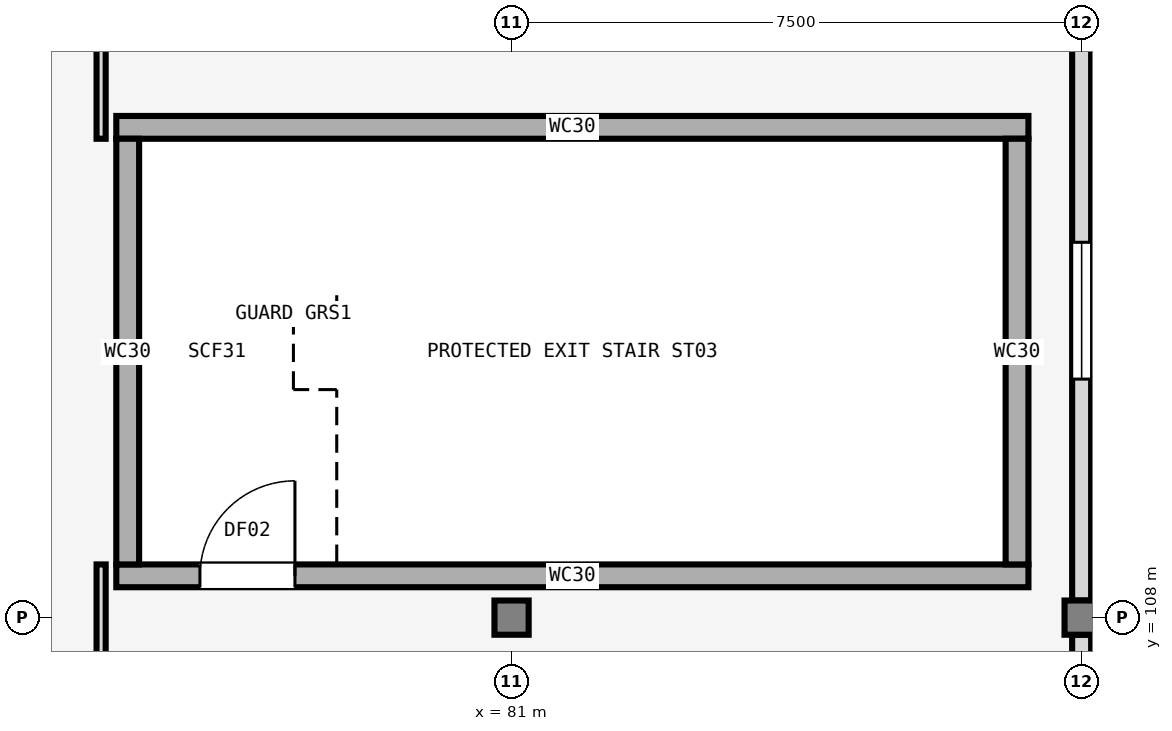
"""IFC4 building model, lengths in metres.
Left out: names, types, materials, properties, quantities, classifications, styles, units other than length and angle.
Written with IfcOpenShell. Run it as: python <this file> out.ifc"""

import sys

from ifc_helpers import new_model, si_unit, direction, frame, frame_2d, origin, origin_2d, place, context, subcontext, project, spatial, rectangle, extrude, element, fill, save


model = new_model("IFC4")
c1 = context("Model", 3, precision=1e-05, world=origin(), true_north=direction((0.0, 1.0)))
c2 = subcontext(c1, "Body", "Model", "MODEL_VIEW")
j1 = project(units=[si_unit("LENGTHUNIT", "METRE"), si_unit("PLANEANGLEUNIT", "RADIAN")], contexts=[c1])
p1 = place(None, origin())
s1 = spatial("IfcSite", under=j1, at=p1, CompositionType="ELEMENT")
p2 = place(p1, origin())
s2 = spatial("IfcBuilding", under=s1, at=p2, CompositionType="ELEMENT")
p3 = place(p2, frame((0.0, 0.0, 17.7)))
s3 = spatial("IfcBuildingStorey", under=s2, at=p3, CompositionType="ELEMENT", Elevation=17.7)
for number, where, z_axis, x_axis in (
    (1, (81.0, 108.0, 0.0), (0.0, 0.0, 1.0), (1.0, 0.0, 0.0)),
    (2, (88.5, 108.0, 0.0), (0.0, 0.0, 1.0), (1.0, 0.0, 0.0)),
):
    element("IfcColumn", number, at=place(p3, frame(where, z_axis=z_axis, x_axis=x_axis)), inside=s3, PredefinedType="COLUMN", context=c2, shape_type="SweptSolid", body=[
        extrude(rectangle(XDim=0.45, YDim=0.45, at=origin_2d()), origin(), (0.0, 0.0, 1.0), 3.96),
    ])
p4 = place(p3, frame((88.5, 100.225, 0.0), z_axis=(0.0, 0.0, 1.0), x_axis=(0.0, 1.0, 0.0)))
e3 = element("IfcWall", 3, at=p4, inside=s3, PredefinedType="SOLIDWALL", context=c2, shape_type="SweptSolid", body=[
    extrude(rectangle(XDim=7.55, YDim=0.25, at=frame_2d((3.775, 0.0))), origin(), (0.0, 0.0, 1.0), 3.49),
])
p5 = place(p4, frame((2.975, 0.0, 0.0)))
e4 = element("IfcOpeningElement", 4, at=p5, cuts=e3, PredefinedType="OPENING", context=c2, shape_type="SweptSolid", body=[
    extrude(rectangle(XDim=1.6, YDim=2.2, at=frame_2d((0.8, 1.1))), frame((0.0, 0.135, 0.0), z_axis=(0.0, -1.0, 0.0), x_axis=(1.0, 0.0, 0.0)), (0.0, 0.0, 1.0), 0.27),
])
p6 = place(p3, frame((88.5, 108.225, 0.0), z_axis=(0.0, 0.0, 1.0), x_axis=(0.0, 1.0, 0.0)))
e5 = element("IfcWall", 5, at=p6, inside=s3, PredefinedType="SOLIDWALL", context=c2, shape_type="SweptSolid", body=[
    extrude(rectangle(XDim=7.625, YDim=0.25, at=frame_2d((3.812, 0.0))), origin(), (0.0, 0.0, 1.0), 3.49),
])
p7 = place(p6, frame((2.913, 0.0, 0.95)))
e6 = element("IfcOpeningElement", 6, at=p7, cuts=e5, PredefinedType="OPENING", context=c2, shape_type="SweptSolid", body=[
    extrude(rectangle(XDim=1.8, YDim=1.5, at=frame_2d((0.9, 0.75))), frame((0.0, 0.135, 0.0), z_axis=(0.0, -1.0, 0.0), x_axis=(1.0, 0.0, 0.0)), (0.0, 0.0, 1.0), 0.27),
])
p8 = place(p3, frame((75.8, 108.55, 0.0), z_axis=(0.0, 0.0, 1.0), x_axis=(1.0, 0.0, 0.0)))
e7 = element("IfcWall", 7, at=p8, inside=s3, PredefinedType="SHEAR", context=c2, shape_type="SweptSolid", body=[
    extrude(rectangle(XDim=12.0, YDim=0.3, at=frame_2d((6.0, 0.0))), origin(), (0.0, 0.0, 1.0), 4.2),
])
p9 = place(p8, frame((1.1, 0.0, 0.0)))
e8 = element("IfcOpeningElement", 8, at=p9, cuts=e7, PredefinedType="OPENING", context=c2, shape_type="SweptSolid", body=[
    extrude(rectangle(XDim=1.25, YDim=2.15, at=frame_2d((0.625, 1.075))), frame((0.0, 0.16, 0.0), z_axis=(0.0, -1.0, 0.0), x_axis=(1.0, 0.0, 0.0)), (0.0, 0.0, 1.0), 0.32),
])
p10 = place(p3, frame((87.8, 114.45, 0.0), z_axis=(0.0, 0.0, 1.0), x_axis=(-1.0, 0.0, 0.0)))
e9 = element("IfcWall", 9, at=p10, inside=s3, PredefinedType="SHEAR", context=c2, shape_type="SweptSolid", body=[
    extrude(rectangle(XDim=12.0, YDim=0.3, at=frame_2d((6.0, 0.0))), origin(), (0.0, 0.0, 1.0), 4.2),
])
for number, where, z_axis, x_axis in (
    (10, (75.95, 114.3, 0.0), (0.0, 0.0, 1.0), (0.0, -1.0, 0.0)),
    (11, (87.65, 108.7, 0.0), (0.0, 0.0, 1.0), (0.0, 1.0, 0.0)),
):
    element("IfcWall", number, at=place(p3, frame(where, z_axis=z_axis, x_axis=x_axis)), inside=s3, PredefinedType="SHEAR", context=c2, shape_type="SweptSolid", body=[
        extrude(rectangle(XDim=5.6, YDim=0.3, at=frame_2d((2.8, 0.0))), origin(), (0.0, 0.0, 1.0), 4.2),
    ])
p11 = place(p3, frame((75.6, 108.7, 0.0), z_axis=(0.0, 0.0, 1.0), x_axis=(0.0, -1.0, 0.0)))
e12 = element("IfcWall", 12, at=p11, inside=s3, PredefinedType="PARTITIONING", context=c2, shape_type="SweptSolid", body=[
    extrude(rectangle(XDim=3.7, YDim=0.12, at=frame_2d((1.85, 0.0))), origin(), (0.0, 0.0, 1.0), 3.15),
])
p12 = place(p3, frame((75.6, 115.895, 0.0), z_axis=(0.0, 0.0, 1.0), x_axis=(0.0, -1.0, 0.0)))
e13 = element("IfcWall", 13, at=p12, inside=s3, PredefinedType="PARTITIONING", context=c2, shape_type="SweptSolid", body=[
    extrude(rectangle(XDim=1.595, YDim=0.12, at=frame_2d((0.797, 0.0))), origin(), (0.0, 0.0, 1.0), 3.15),
])
p13 = place(p7, origin())
e14 = element("IfcWindow", 14, at=p13, inside=s3, PartitioningType="SINGLE_PANEL", PredefinedType="WINDOW", context=c2, shape_type="SweptSolid", body=[
    extrude(rectangle(XDim=1.8, YDim=1.5, at=frame_2d((0.9, 0.75))), frame((0.0, 0.03, 0.0), z_axis=(0.0, -1.0, 0.0), x_axis=(1.0, 0.0, 0.0)), (0.0, 0.0, 1.0), 0.06),
])
fill(e6, e14)
p14 = place(p9, origin())
e15 = element("IfcDoor", 15, at=p14, inside=s3, OperationType="SINGLE_SWING_RIGHT", PredefinedType="DOOR", context=c2, shape_type="SweptSolid", body=[
    extrude(rectangle(XDim=1.25, YDim=2.15, at=frame_2d((0.625, 1.075))), frame((0.0, 0.025, 0.0), z_axis=(0.0, -1.0, 0.0), x_axis=(1.0, 0.0, 0.0)), (0.0, 0.0, 1.0), 0.05),
])
fill(e8, e15)
save(model, sys.argv[1])
